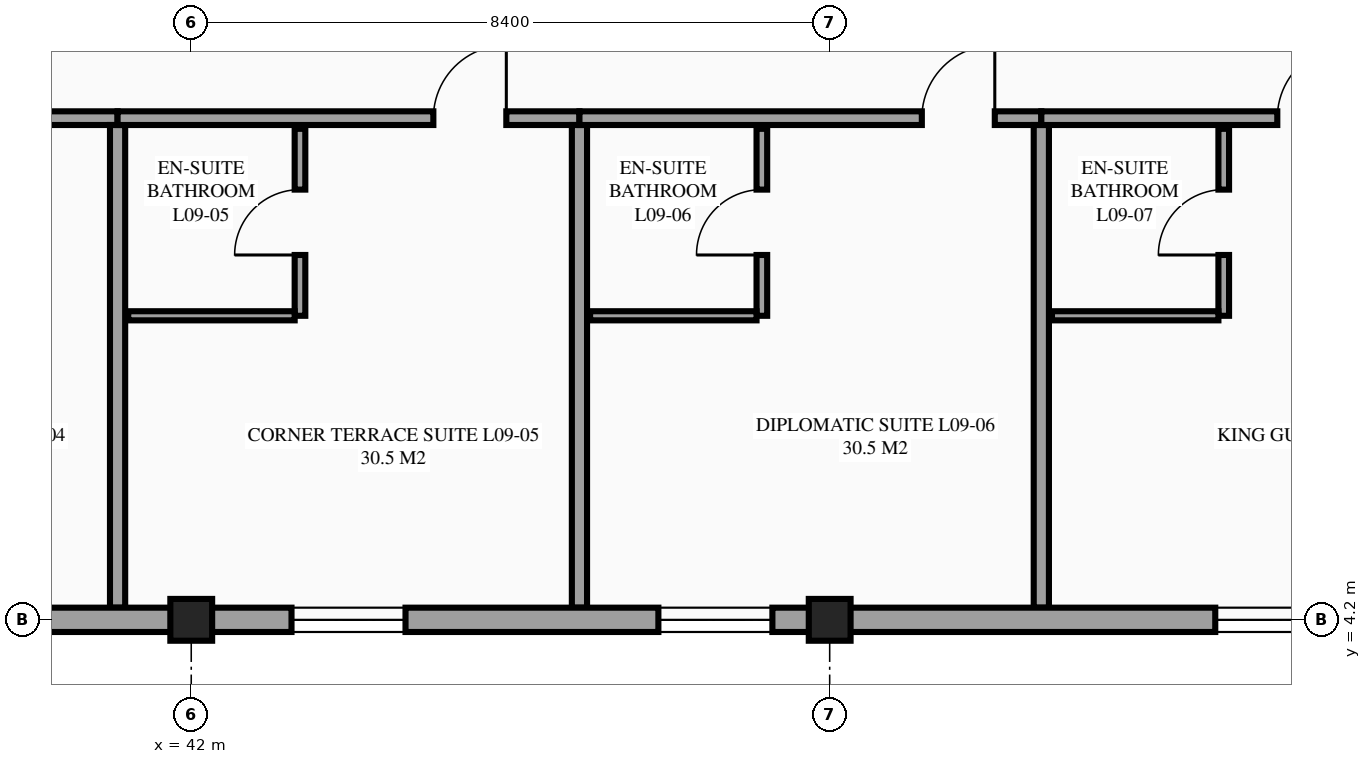
"""IFC4 building model, lengths in metres.
Left out: names, types, materials, properties, quantities, classifications, styles, units other than length and angle.
Written with IfcOpenShell. Run it as: python <this file> out.ifc"""

import sys

from ifc_helpers import new_model, si_unit, direction, frame, frame_2d, origin, origin_2d, place, context, subcontext, project, spatial, rectangle, extrude, element, fill, save


model = new_model("IFC4")
c1 = context("Model", 3, precision=1e-05, world=origin(), true_north=direction((0.0, 1.0)))
c2 = subcontext(c1, "Body", "Model", "MODEL_VIEW")
j1 = project(units=[si_unit("LENGTHUNIT", "METRE"), si_unit("PLANEANGLEUNIT", "RADIAN")], contexts=[c1])
p1 = place(None, origin())
s1 = spatial("IfcSite", under=j1, at=p1, CompositionType="ELEMENT")
p2 = place(p1, origin())
s2 = spatial("IfcBuilding", under=s1, at=p2, CompositionType="ELEMENT")
p3 = place(p2, frame((0.0, 0.0, 36.3)))
s3 = spatial("IfcBuildingStorey", under=s2, at=p3, CompositionType="ELEMENT", Elevation=36.3)
for number, where, z_axis, x_axis in (
    (1, (42.0, 4.2, 0.0), (0.0, 0.0, 1.0), (1.0, 0.0, 0.0)),
    (2, (50.4, 4.2, 0.0), (0.0, 0.0, 1.0), (1.0, 0.0, 0.0)),
):
    element("IfcColumn", number, at=place(p3, frame(where, z_axis=z_axis, x_axis=x_axis)), inside=s3, PredefinedType="COLUMN", context=c2, shape_type="SweptSolid", body=[
        extrude(rectangle(XDim=0.55, YDim=0.55, at=origin_2d()), origin(), (0.0, 0.0, 1.0), 3.6),
    ])
p4 = place(p3, frame((34.954, 10.8, 0.0), z_axis=(0.0, 0.0, 1.0), x_axis=(1.0, 0.0, 0.0)))
e3 = element("IfcWall", 3, at=p4, inside=s3, PredefinedType="PARTITIONING", context=c2, shape_type="SweptSolid", body=[
    extrude(rectangle(XDim=6.077, YDim=0.18, at=frame_2d((3.039, 0.0))), origin(), (0.0, 0.0, 1.0), 3.375),
])
p5 = place(p4, frame((4.155, 0.0, 0.0)))
e4 = element("IfcOpeningElement", 4, at=p5, cuts=e3, PredefinedType="OPENING", context=c2, shape_type="SweptSolid", body=[
    extrude(rectangle(XDim=0.96, YDim=2.15, at=frame_2d((0.48, 1.075))), frame((0.0, 0.1, 0.0), z_axis=(0.0, -1.0, 0.0), x_axis=(1.0, 0.0, 0.0)), (0.0, 0.0, 1.0), 0.2),
])
p6 = place(p3, frame((41.031, 4.36, 0.0), z_axis=(0.0, 0.0, 1.0), x_axis=(0.0, 1.0, 0.0)))
e5 = element("IfcWall", 5, at=p6, inside=s3, PredefinedType="PARTITIONING", context=c2, shape_type="SweptSolid", body=[
    extrude(rectangle(XDim=6.35, YDim=0.2, at=frame_2d((3.175, 0.0))), origin(), (0.0, 0.0, 1.0), 3.375),
])
p7 = place(p3, frame((41.031, 10.8, 0.0), z_axis=(0.0, 0.0, 1.0), x_axis=(1.0, 0.0, 0.0)))
e6 = element("IfcWall", 6, at=p7, inside=s3, PredefinedType="PARTITIONING", context=c2, shape_type="SweptSolid", body=[
    extrude(rectangle(XDim=6.077, YDim=0.18, at=frame_2d((3.039, 0.0))), origin(), (0.0, 0.0, 1.0), 3.375),
])
p8 = place(p7, frame((4.155, 0.0, 0.0)))
e7 = element("IfcOpeningElement", 7, at=p8, cuts=e6, PredefinedType="OPENING", context=c2, shape_type="SweptSolid", body=[
    extrude(rectangle(XDim=0.96, YDim=2.15, at=frame_2d((0.48, 1.075))), frame((0.0, 0.1, 0.0), z_axis=(0.0, -1.0, 0.0), x_axis=(1.0, 0.0, 0.0)), (0.0, 0.0, 1.0), 0.2),
])
p9 = place(p3, frame((47.108, 4.36, 0.0), z_axis=(0.0, 0.0, 1.0), x_axis=(0.0, 1.0, 0.0)))
e8 = element("IfcWall", 8, at=p9, inside=s3, PredefinedType="PARTITIONING", context=c2, shape_type="SweptSolid", body=[
    extrude(rectangle(XDim=6.35, YDim=0.2, at=frame_2d((3.175, 0.0))), origin(), (0.0, 0.0, 1.0), 3.375),
])
p10 = place(p3, frame((43.431, 8.2, 0.0), z_axis=(0.0, 0.0, 1.0), x_axis=(0.0, 1.0, 0.0)))
e9 = element("IfcWall", 9, at=p10, inside=s3, PredefinedType="PARTITIONING", context=c2, shape_type="SweptSolid", body=[
    extrude(rectangle(XDim=2.46, YDim=0.14, at=frame_2d((1.23, 0.0))), origin(), (0.0, 0.0, 1.0), 3.375),
])
p11 = place(p10, frame((0.8, 0.0, 0.0)))
e10 = element("IfcOpeningElement", 10, at=p11, cuts=e9, PredefinedType="OPENING", context=c2, shape_type="SweptSolid", body=[
    extrude(rectangle(XDim=0.86, YDim=2.1, at=frame_2d((0.43, 1.05))), frame((0.0, 0.08, 0.0), z_axis=(0.0, -1.0, 0.0), x_axis=(1.0, 0.0, 0.0)), (0.0, 0.0, 1.0), 0.16),
])
p12 = place(p3, frame((41.171, 8.2, 0.0), z_axis=(0.0, 0.0, 1.0), x_axis=(1.0, 0.0, 0.0)))
e11 = element("IfcWall", 11, at=p12, inside=s3, PredefinedType="PARTITIONING", context=c2, shape_type="SweptSolid", body=[
    extrude(rectangle(XDim=2.19, YDim=0.12, at=frame_2d((1.095, 0.0))), origin(), (0.0, 0.0, 1.0), 3.375),
])
p13 = place(p3, frame((47.108, 10.8, 0.0), z_axis=(0.0, 0.0, 1.0), x_axis=(1.0, 0.0, 0.0)))
e12 = element("IfcWall", 12, at=p13, inside=s3, PredefinedType="PARTITIONING", context=c2, shape_type="SweptSolid", body=[
    extrude(rectangle(XDim=6.077, YDim=0.18, at=frame_2d((3.039, 0.0))), origin(), (0.0, 0.0, 1.0), 3.375),
])
p14 = place(p13, frame((4.505, 0.0, 0.0)))
e13 = element("IfcOpeningElement", 13, at=p14, cuts=e12, PredefinedType="OPENING", context=c2, shape_type="SweptSolid", body=[
    extrude(rectangle(XDim=0.96, YDim=2.15, at=frame_2d((0.48, 1.075))), frame((0.0, 0.1, 0.0), z_axis=(0.0, -1.0, 0.0), x_axis=(1.0, 0.0, 0.0)), (0.0, 0.0, 1.0), 0.2),
])
p15 = place(p3, frame((53.185, 4.36, 0.0), z_axis=(0.0, 0.0, 1.0), x_axis=(0.0, 1.0, 0.0)))
e14 = element("IfcWall", 14, at=p15, inside=s3, PredefinedType="PARTITIONING", context=c2, shape_type="SweptSolid", body=[
    extrude(rectangle(XDim=6.35, YDim=0.2, at=frame_2d((3.175, 0.0))), origin(), (0.0, 0.0, 1.0), 3.375),
])
p16 = place(p3, frame((49.508, 8.2, 0.0), z_axis=(0.0, 0.0, 1.0), x_axis=(0.0, 1.0, 0.0)))
e15 = element("IfcWall", 15, at=p16, inside=s3, PredefinedType="PARTITIONING", context=c2, shape_type="SweptSolid", body=[
    extrude(rectangle(XDim=2.46, YDim=0.14, at=frame_2d((1.23, 0.0))), origin(), (0.0, 0.0, 1.0), 3.375),
])
p17 = place(p16, frame((0.8, 0.0, 0.0)))
e16 = element("IfcOpeningElement", 16, at=p17, cuts=e15, PredefinedType="OPENING", context=c2, shape_type="SweptSolid", body=[
    extrude(rectangle(XDim=0.86, YDim=2.1, at=frame_2d((0.43, 1.05))), frame((0.0, 0.08, 0.0), z_axis=(0.0, -1.0, 0.0), x_axis=(1.0, 0.0, 0.0)), (0.0, 0.0, 1.0), 0.16),
])
p18 = place(p3, frame((47.248, 8.2, 0.0), z_axis=(0.0, 0.0, 1.0), x_axis=(1.0, 0.0, 0.0)))
e17 = element("IfcWall", 17, at=p18, inside=s3, PredefinedType="PARTITIONING", context=c2, shape_type="SweptSolid", body=[
    extrude(rectangle(XDim=2.19, YDim=0.12, at=frame_2d((1.095, 0.0))), origin(), (0.0, 0.0, 1.0), 3.375),
])
p19 = place(p3, frame((53.185, 10.8, 0.0), z_axis=(0.0, 0.0, 1.0), x_axis=(1.0, 0.0, 0.0)))
e18 = element("IfcWall", 18, at=p19, inside=s3, PredefinedType="PARTITIONING", context=c2, shape_type="SweptSolid", body=[
    extrude(rectangle(XDim=6.077, YDim=0.18, at=frame_2d((3.039, 0.0))), origin(), (0.0, 0.0, 1.0), 3.375),
])
p20 = place(p19, frame((3.105, 0.0, 0.0)))
e19 = element("IfcOpeningElement", 19, at=p20, cuts=e18, PredefinedType="OPENING", context=c2, shape_type="SweptSolid", body=[
    extrude(rectangle(XDim=0.96, YDim=2.15, at=frame_2d((0.48, 1.075))), frame((0.0, 0.1, 0.0), z_axis=(0.0, -1.0, 0.0), x_axis=(1.0, 0.0, 0.0)), (0.0, 0.0, 1.0), 0.2),
])
p21 = place(p3, frame((55.585, 8.2, 0.0), z_axis=(0.0, 0.0, 1.0), x_axis=(0.0, 1.0, 0.0)))
e20 = element("IfcWall", 20, at=p21, inside=s3, PredefinedType="PARTITIONING", context=c2, shape_type="SweptSolid", body=[
    extrude(rectangle(XDim=2.46, YDim=0.14, at=frame_2d((1.23, 0.0))), origin(), (0.0, 0.0, 1.0), 3.375),
])
p22 = place(p21, frame((0.8, 0.0, 0.0)))
e21 = element("IfcOpeningElement", 21, at=p22, cuts=e20, PredefinedType="OPENING", context=c2, shape_type="SweptSolid", body=[
    extrude(rectangle(XDim=0.86, YDim=2.1, at=frame_2d((0.43, 1.05))), frame((0.0, 0.08, 0.0), z_axis=(0.0, -1.0, 0.0), x_axis=(1.0, 0.0, 0.0)), (0.0, 0.0, 1.0), 0.16),
])
p23 = place(p3, frame((53.325, 8.2, 0.0), z_axis=(0.0, 0.0, 1.0), x_axis=(1.0, 0.0, 0.0)))
e22 = element("IfcWall", 22, at=p23, inside=s3, PredefinedType="PARTITIONING", context=c2, shape_type="SweptSolid", body=[
    extrude(rectangle(XDim=2.19, YDim=0.12, at=frame_2d((1.095, 0.0))), origin(), (0.0, 0.0, 1.0), 3.375),
])
p24 = place(p3, frame((25.2, 4.2, 0.0), z_axis=(0.0, 0.0, 1.0), x_axis=(1.0, 0.0, 0.0)))
e23 = element("IfcWall", 23, at=p24, inside=s3, PredefinedType="STANDARD", context=c2, shape_type="SweptSolid", body=[
    extrude(rectangle(XDim=16.8, YDim=0.32, at=frame_2d((8.4, 0.0))), origin(), (0.0, 0.0, 1.0), 2.53),
])
p25 = place(p24, frame((0.638, 0.0, 0.85)))
e24 = element("IfcOpeningElement", 24, at=p25, cuts=e23, PredefinedType="OPENING", context=c2, shape_type="SweptSolid", body=[
    extrude(rectangle(XDim=1.5, YDim=1.5, at=frame_2d((0.75, 0.75))), frame((0.0, 0.17, 0.0), z_axis=(0.0, -1.0, 0.0), x_axis=(1.0, 0.0, 0.0)), (0.0, 0.0, 1.0), 0.34),
])
p26 = place(p24, frame((5.965, 0.0, 0.85)))
e25 = element("IfcOpeningElement", 25, at=p26, cuts=e23, PredefinedType="OPENING", context=c2, shape_type="SweptSolid", body=[
    extrude(rectangle(XDim=1.5, YDim=1.5, at=frame_2d((0.75, 0.75))), frame((0.0, 0.17, 0.0), z_axis=(0.0, -1.0, 0.0), x_axis=(1.0, 0.0, 0.0)), (0.0, 0.0, 1.0), 0.34),
])
p27 = place(p24, frame((12.042, 0.0, 0.85)))
e26 = element("IfcOpeningElement", 26, at=p27, cuts=e23, PredefinedType="OPENING", context=c2, shape_type="SweptSolid", body=[
    extrude(rectangle(XDim=1.5, YDim=1.5, at=frame_2d((0.75, 0.75))), frame((0.0, 0.17, 0.0), z_axis=(0.0, -1.0, 0.0), x_axis=(1.0, 0.0, 0.0)), (0.0, 0.0, 1.0), 0.34),
])
p28 = place(p3, frame((42.0, 4.2, 0.0), z_axis=(0.0, 0.0, 1.0), x_axis=(1.0, 0.0, 0.0)))
e27 = element("IfcWall", 27, at=p28, inside=s3, PredefinedType="STANDARD", context=c2, shape_type="SweptSolid", body=[
    extrude(rectangle(XDim=8.4, YDim=0.32, at=frame_2d((4.2, 0.0))), origin(), (0.0, 0.0, 1.0), 3.07),
])
p29 = place(p28, frame((1.319, 0.0, 0.85)))
e28 = element("IfcOpeningElement", 28, at=p29, cuts=e27, PredefinedType="OPENING", context=c2, shape_type="SweptSolid", body=[
    extrude(rectangle(XDim=1.5, YDim=1.5, at=frame_2d((0.75, 0.75))), frame((0.0, 0.17, 0.0), z_axis=(0.0, -1.0, 0.0), x_axis=(1.0, 0.0, 0.0)), (0.0, 0.0, 1.0), 0.34),
])
p30 = place(p28, frame((6.146, 0.0, 0.85)))
e29 = element("IfcOpeningElement", 29, at=p30, cuts=e27, PredefinedType="OPENING", context=c2, shape_type="SweptSolid", body=[
    extrude(rectangle(XDim=1.5, YDim=1.5, at=frame_2d((0.75, 0.75))), frame((0.0, 0.17, 0.0), z_axis=(0.0, -1.0, 0.0), x_axis=(1.0, 0.0, 0.0)), (0.0, 0.0, 1.0), 0.34),
])
p31 = place(p3, frame((50.4, 4.2, 0.0), z_axis=(0.0, 0.0, 1.0), x_axis=(1.0, 0.0, 0.0)))
e30 = element("IfcWall", 30, at=p31, inside=s3, PredefinedType="STANDARD", context=c2, shape_type="SweptSolid", body=[
    extrude(rectangle(XDim=16.8, YDim=0.32, at=frame_2d((8.4, 0.0))), origin(), (0.0, 0.0, 1.0), 2.68),
])
p32 = place(p31, frame((5.073, 0.0, 0.85)))
e31 = element("IfcOpeningElement", 31, at=p32, cuts=e30, PredefinedType="OPENING", context=c2, shape_type="SweptSolid", body=[
    extrude(rectangle(XDim=1.5, YDim=1.5, at=frame_2d((0.75, 0.75))), frame((0.0, 0.17, 0.0), z_axis=(0.0, -1.0, 0.0), x_axis=(1.0, 0.0, 0.0)), (0.0, 0.0, 1.0), 0.34),
])
p33 = place(p31, frame((11.15, 0.0, 0.85)))
e32 = element("IfcOpeningElement", 32, at=p33, cuts=e30, PredefinedType="OPENING", context=c2, shape_type="SweptSolid", body=[
    extrude(rectangle(XDim=1.5, YDim=1.5, at=frame_2d((0.75, 0.75))), frame((0.0, 0.17, 0.0), z_axis=(0.0, -1.0, 0.0), x_axis=(1.0, 0.0, 0.0)), (0.0, 0.0, 1.0), 0.34),
])
p34 = place(p29, origin())
e33 = element("IfcWindow", 33, at=p34, inside=s3, PartitioningType="SINGLE_PANEL", PredefinedType="WINDOW", context=c2, shape_type="SweptSolid", body=[
    extrude(rectangle(XDim=1.5, YDim=1.5, at=frame_2d((0.75, 0.75))), frame((0.0, 0.03, 0.0), z_axis=(0.0, -1.0, 0.0), x_axis=(1.0, 0.0, 0.0)), (0.0, 0.0, 1.0), 0.06),
])
fill(e28, e33)
p35 = place(p30, origin())
e34 = element("IfcWindow", 34, at=p35, inside=s3, PartitioningType="SINGLE_PANEL", PredefinedType="WINDOW", context=c2, shape_type="SweptSolid", body=[
    extrude(rectangle(XDim=1.5, YDim=1.5, at=frame_2d((0.75, 0.75))), frame((0.0, 0.03, 0.0), z_axis=(0.0, -1.0, 0.0), x_axis=(1.0, 0.0, 0.0)), (0.0, 0.0, 1.0), 0.06),
])
fill(e29, e34)
p36 = place(p32, origin())
e35 = element("IfcWindow", 35, at=p36, inside=s3, PartitioningType="SINGLE_PANEL", PredefinedType="WINDOW", context=c2, shape_type="SweptSolid", body=[
    extrude(rectangle(XDim=1.5, YDim=1.5, at=frame_2d((0.75, 0.75))), frame((0.0, 0.03, 0.0), z_axis=(0.0, -1.0, 0.0), x_axis=(1.0, 0.0, 0.0)), (0.0, 0.0, 1.0), 0.06),
])
fill(e31, e35)
p37 = place(p8, origin())
e36 = element("IfcDoor", 36, at=p37, inside=s3, OperationType="SINGLE_SWING_RIGHT", PredefinedType="DOOR", context=c2, shape_type="SweptSolid", body=[
    extrude(rectangle(XDim=0.96, YDim=2.15, at=frame_2d((0.48, 1.075))), frame((0.0, 0.025, 0.0), z_axis=(0.0, -1.0, 0.0), x_axis=(1.0, 0.0, 0.0)), (0.0, 0.0, 1.0), 0.05),
])
fill(e7, e36)
p38 = place(p11, origin())
e37 = element("IfcDoor", 37, at=p38, inside=s3, OperationType="SINGLE_SWING_LEFT", PredefinedType="DOOR", context=c2, shape_type="SweptSolid", body=[
    extrude(rectangle(XDim=0.86, YDim=2.1, at=frame_2d((0.43, 1.05))), frame((0.0, 0.025, 0.0), z_axis=(0.0, -1.0, 0.0), x_axis=(1.0, 0.0, 0.0)), (0.0, 0.0, 1.0), 0.05),
])
fill(e10, e37)
p39 = place(p14, origin())
e38 = element("IfcDoor", 38, at=p39, inside=s3, OperationType="SINGLE_SWING_RIGHT", PredefinedType="DOOR", context=c2, shape_type="SweptSolid", body=[
    extrude(rectangle(XDim=0.96, YDim=2.15, at=frame_2d((0.48, 1.075))), frame((0.0, 0.025, 0.0), z_axis=(0.0, -1.0, 0.0), x_axis=(1.0, 0.0, 0.0)), (0.0, 0.0, 1.0), 0.05),
])
fill(e13, e38)
p40 = place(p17, origin())
e39 = element("IfcDoor", 39, at=p40, inside=s3, OperationType="SINGLE_SWING_LEFT", PredefinedType="DOOR", context=c2, shape_type="SweptSolid", body=[
    extrude(rectangle(XDim=0.86, YDim=2.1, at=frame_2d((0.43, 1.05))), frame((0.0, 0.025, 0.0), z_axis=(0.0, -1.0, 0.0), x_axis=(1.0, 0.0, 0.0)), (0.0, 0.0, 1.0), 0.05),
])
fill(e16, e39)
p41 = place(p20, origin())
e40 = element("IfcDoor", 40, at=p41, inside=s3, OperationType="SINGLE_SWING_RIGHT", PredefinedType="DOOR", context=c2, shape_type="SweptSolid", body=[
    extrude(rectangle(XDim=0.96, YDim=2.15, at=frame_2d((0.48, 1.075))), frame((0.0, 0.025, 0.0), z_axis=(0.0, -1.0, 0.0), x_axis=(1.0, 0.0, 0.0)), (0.0, 0.0, 1.0), 0.05),
])
fill(e19, e40)
p42 = place(p22, origin())
e41 = element("IfcDoor", 41, at=p42, inside=s3, OperationType="SINGLE_SWING_LEFT", PredefinedType="DOOR", context=c2, shape_type="SweptSolid", body=[
    extrude(rectangle(XDim=0.86, YDim=2.1, at=frame_2d((0.43, 1.05))), frame((0.0, 0.025, 0.0), z_axis=(0.0, -1.0, 0.0), x_axis=(1.0, 0.0, 0.0)), (0.0, 0.0, 1.0), 0.05),
])
fill(e21, e41)
save(model, sys.argv[1])
